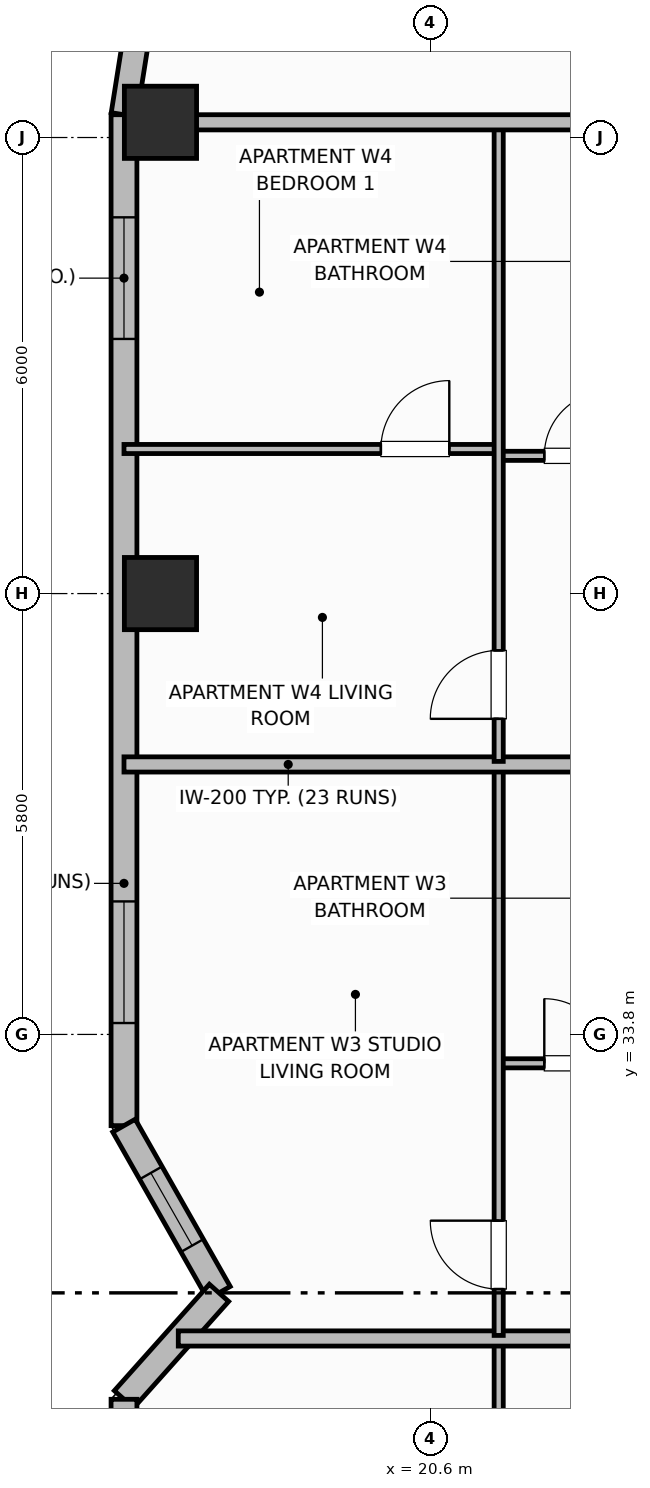
"""IFC4 building model, lengths in metres.
Left out: names, types, materials, properties, quantities, classifications, styles, units other than length and angle.
Written with IfcOpenShell. Run it as: python <this file> out.ifc"""

import sys

from ifc_helpers import new_model, si_unit, direction, frame, frame_2d, origin, origin_2d, place, context, subcontext, project, spatial, rectangle, extrude, element, fill, save


model = new_model("IFC4")
c1 = context("Model", 3, precision=1e-05, world=origin(), true_north=direction((0.0, 1.0)))
c2 = subcontext(c1, "Body", "Model", "MODEL_VIEW")
j1 = project(units=[si_unit("LENGTHUNIT", "METRE"), si_unit("PLANEANGLEUNIT", "RADIAN")], contexts=[c1])
p1 = place(None, origin())
s1 = spatial("IfcSite", under=j1, at=p1, CompositionType="ELEMENT")
p2 = place(p1, origin())
s2 = spatial("IfcBuilding", under=s1, at=p2, CompositionType="ELEMENT")
p3 = place(p2, frame((0.0, 0.0, 170.0)))
s3 = spatial("IfcBuildingStorey", under=s2, at=p3, CompositionType="ELEMENT", Elevation=170.0)
for number, where, z_axis, x_axis in (
    (1, (17.05, 39.6, 0.0), (0.0, 0.0, 1.0), (1.0, 0.0, 0.0)),
    (2, (17.05, 45.8, 0.0), (0.0, 0.0, 1.0), (1.0, 0.0, 0.0)),
):
    element("IfcColumn", number, at=place(p3, frame(where, z_axis=z_axis, x_axis=x_axis)), inside=s3, PredefinedType="COLUMN", context=c2, shape_type="SweptSolid", body=[
        extrude(rectangle(XDim=0.95, YDim=0.95, at=origin_2d()), origin(), (0.0, 0.0, 1.0), 3.7),
    ])
p4 = place(p3, frame((16.748, 47.022, 0.0), z_axis=(0.0, 0.0, 1.0), x_axis=(-0.156481329164, -0.987680916907, 0.0)))
e3 = element("IfcWall", 3, at=p4, inside=s3, PredefinedType="SOLIDWALL", context=c2, shape_type="SweptSolid", body=[
    extrude(rectangle(XDim=1.136, YDim=0.34, at=frame_2d((0.568, 0.0))), origin(), (0.0, 0.0, 1.0), 2.72),
])
p5 = place(p3, frame((16.57, 45.9, 0.0), z_axis=(0.0, 0.0, 1.0), x_axis=(0.0, -1.0, 0.0)))
e4 = element("IfcWall", 4, at=p5, inside=s3, PredefinedType="SOLIDWALL", context=c2, shape_type="SweptSolid", body=[
    extrude(rectangle(XDim=13.3, YDim=0.34, at=frame_2d((6.65, 0.0))), origin(), (0.0, 0.0, 1.0), 2.72),
])
p6 = place(p5, frame((1.35, 0.0, 0.7)))
e5 = element("IfcOpeningElement", 5, at=p6, cuts=e4, PredefinedType="OPENING", context=c2, shape_type="SweptSolid", body=[
    extrude(rectangle(XDim=1.6, YDim=1.9, at=frame_2d((0.8, 0.95))), frame((0.0, 0.18, 0.0), z_axis=(0.0, -1.0, 0.0), x_axis=(1.0, 0.0, 0.0)), (0.0, 0.0, 1.0), 0.36),
])
p7 = place(p5, frame((10.35, 0.0, 0.7)))
e6 = element("IfcOpeningElement", 6, at=p7, cuts=e4, PredefinedType="OPENING", context=c2, shape_type="SweptSolid", body=[
    extrude(rectangle(XDim=1.6, YDim=1.9, at=frame_2d((0.8, 0.95))), frame((0.0, 0.18, 0.0), z_axis=(0.0, -1.0, 0.0), x_axis=(1.0, 0.0, 0.0)), (0.0, 0.0, 1.0), 0.36),
])
p8 = place(p3, frame((16.57, 32.6, 0.0), z_axis=(0.0, 0.0, 1.0), x_axis=(0.493976255291, -0.869475393101, 0.0)))
e7 = element("IfcWall", 7, at=p8, inside=s3, PredefinedType="SOLIDWALL", context=c2, shape_type="SweptSolid", body=[
    extrude(rectangle(XDim=2.531, YDim=0.34, at=frame_2d((1.265, 0.0))), origin(), (0.0, 0.0, 1.0), 2.72),
])
p9 = place(p8, frame((0.715, 0.0, 0.91)))
e8 = element("IfcOpeningElement", 8, at=p9, cuts=e7, PredefinedType="OPENING", context=c2, shape_type="SweptSolid", body=[
    extrude(rectangle(XDim=1.1, YDim=1.65, at=frame_2d((0.55, 0.825))), frame((0.0, 0.18, 0.0), z_axis=(0.0, -1.0, 0.0), x_axis=(1.0, 0.0, 0.0)), (0.0, 0.0, 1.0), 0.36),
])
p10 = place(p3, frame((17.82, 30.4, 0.0), z_axis=(0.0, 0.0, 1.0), x_axis=(-0.666041619974, -0.74591457987, 0.0)))
e9 = element("IfcWall", 9, at=p10, inside=s3, PredefinedType="SOLIDWALL", context=c2, shape_type="SweptSolid", body=[
    extrude(rectangle(XDim=1.877, YDim=0.34, at=frame_2d((0.938, 0.0))), origin(), (0.0, 0.0, 1.0), 2.72),
])
p11 = place(p3, frame((16.57, 29.0, 0.0), z_axis=(0.0, 0.0, 1.0), x_axis=(0.0, -1.0, 0.0)))
e10 = element("IfcWall", 10, at=p11, inside=s3, PredefinedType="SOLIDWALL", context=c2, shape_type="SweptSolid", body=[
    extrude(rectangle(XDim=1.6, YDim=0.34, at=frame_2d((0.8, 0.0))), origin(), (0.0, 0.0, 1.0), 2.72),
])
p12 = place(p3, frame((21.5, 19.54, 0.0), z_axis=(0.0, 0.0, 1.0), x_axis=(0.0, 1.0, 0.0)))
e11 = element("IfcWall", 11, at=p12, inside=s3, PredefinedType="PARTITIONING", context=c2, shape_type="SweptSolid", body=[
    extrude(rectangle(XDim=10.22, YDim=0.12, at=frame_2d((5.11, 0.0))), origin(), (0.0, 0.0, 1.0), 2.55),
])
p13 = place(p12, frame((0.41, 0.0, 0.0)))
e12 = element("IfcOpeningElement", 12, at=p13, cuts=e11, PredefinedType="OPENING", context=c2, shape_type="SweptSolid", body=[
    extrude(rectangle(XDim=0.9, YDim=2.1, at=frame_2d((0.45, 1.05))), frame((0.0, 0.07, 0.0), z_axis=(0.0, -1.0, 0.0), x_axis=(1.0, 0.0, 0.0)), (0.0, 0.0, 1.0), 0.14),
])
p14 = place(p3, frame((17.284, 29.8, 0.0), z_axis=(0.0, 0.0, 1.0), x_axis=(1.0, 0.0, 0.0)))
e13 = element("IfcWall", 13, at=p14, inside=s3, PredefinedType="PARTITIONING", context=c2, shape_type="SweptSolid", body=[
    extrude(rectangle(XDim=6.466, YDim=0.2, at=frame_2d((3.233, 0.0))), origin(), (0.0, 0.0, 1.0), 2.55),
])
p15 = place(p3, frame((21.5, 33.42, 0.0), z_axis=(0.0, 0.0, 1.0), x_axis=(1.0, 0.0, 0.0)))
e14 = element("IfcWall", 14, at=p15, inside=s3, PredefinedType="PARTITIONING", context=c2, shape_type="SweptSolid", body=[
    extrude(rectangle(XDim=2.25, YDim=0.12, at=frame_2d((1.125, 0.0))), origin(), (0.0, 0.0, 1.0), 2.55),
])
p16 = place(p15, frame((0.6, 0.0, 0.0)))
e15 = element("IfcOpeningElement", 15, at=p16, cuts=e14, PredefinedType="OPENING", context=c2, shape_type="SweptSolid", body=[
    extrude(rectangle(XDim=0.85, YDim=2.1, at=frame_2d((0.425, 1.05))), frame((0.0, 0.07, 0.0), z_axis=(0.0, -1.0, 0.0), x_axis=(1.0, 0.0, 0.0)), (0.0, 0.0, 1.0), 0.14),
])
p17 = place(p3, frame((21.5, 29.84, 0.0), z_axis=(0.0, 0.0, 1.0), x_axis=(0.0, 1.0, 0.0)))
e16 = element("IfcWall", 16, at=p17, inside=s3, PredefinedType="PARTITIONING", context=c2, shape_type="SweptSolid", body=[
    extrude(rectangle(XDim=7.472, YDim=0.12, at=frame_2d((3.736, 0.0))), origin(), (0.0, 0.0, 1.0), 2.55),
])
p18 = place(p17, frame((0.61, 0.0, 0.0)))
e17 = element("IfcOpeningElement", 17, at=p18, cuts=e16, PredefinedType="OPENING", context=c2, shape_type="SweptSolid", body=[
    extrude(rectangle(XDim=0.9, YDim=2.1, at=frame_2d((0.45, 1.05))), frame((0.0, 0.07, 0.0), z_axis=(0.0, -1.0, 0.0), x_axis=(1.0, 0.0, 0.0)), (0.0, 0.0, 1.0), 0.14),
])
p19 = place(p3, frame((16.57, 37.352, 0.0), z_axis=(0.0, 0.0, 1.0), x_axis=(1.0, 0.0, 0.0)))
e18 = element("IfcWall", 18, at=p19, inside=s3, PredefinedType="PARTITIONING", context=c2, shape_type="SweptSolid", body=[
    extrude(rectangle(XDim=7.18, YDim=0.2, at=frame_2d((3.59, 0.0))), origin(), (0.0, 0.0, 1.0), 2.55),
])
p20 = place(p3, frame((21.5, 41.412, 0.0), z_axis=(0.0, 0.0, 1.0), x_axis=(1.0, 0.0, 0.0)))
e19 = element("IfcWall", 19, at=p20, inside=s3, PredefinedType="PARTITIONING", context=c2, shape_type="SweptSolid", body=[
    extrude(rectangle(XDim=2.25, YDim=0.12, at=frame_2d((1.125, 0.0))), origin(), (0.0, 0.0, 1.0), 2.55),
])
p21 = place(p20, frame((0.6, 0.0, 0.0)))
e20 = element("IfcOpeningElement", 20, at=p21, cuts=e19, PredefinedType="OPENING", context=c2, shape_type="SweptSolid", body=[
    extrude(rectangle(XDim=0.85, YDim=2.1, at=frame_2d((0.425, 1.05))), frame((0.0, 0.07, 0.0), z_axis=(0.0, -1.0, 0.0), x_axis=(1.0, 0.0, 0.0)), (0.0, 0.0, 1.0), 0.14),
])
p22 = place(p3, frame((16.57, 41.502, 0.0), z_axis=(0.0, 0.0, 1.0), x_axis=(1.0, 0.0, 0.0)))
e21 = element("IfcWall", 21, at=p22, inside=s3, PredefinedType="PARTITIONING", context=c2, shape_type="SweptSolid", body=[
    extrude(rectangle(XDim=4.93, YDim=0.12, at=frame_2d((2.465, 0.0))), origin(), (0.0, 0.0, 1.0), 2.55),
])
p23 = place(p22, frame((3.38, 0.0, 0.0)))
e22 = element("IfcOpeningElement", 22, at=p23, cuts=e21, PredefinedType="OPENING", context=c2, shape_type="SweptSolid", body=[
    extrude(rectangle(XDim=0.9, YDim=2.1, at=frame_2d((0.45, 1.05))), frame((0.0, 0.07, 0.0), z_axis=(0.0, -1.0, 0.0), x_axis=(1.0, 0.0, 0.0)), (0.0, 0.0, 1.0), 0.14),
])
p24 = place(p3, frame((21.5, 37.392, 0.0), z_axis=(0.0, 0.0, 1.0), x_axis=(0.0, 1.0, 0.0)))
e23 = element("IfcWall", 23, at=p24, inside=s3, PredefinedType="PARTITIONING", context=c2, shape_type="SweptSolid", body=[
    extrude(rectangle(XDim=8.368, YDim=0.12, at=frame_2d((4.184, 0.0))), origin(), (0.0, 0.0, 1.0), 2.55),
])
p25 = place(p24, frame((0.56, 0.0, 0.0)))
e24 = element("IfcOpeningElement", 24, at=p25, cuts=e23, PredefinedType="OPENING", context=c2, shape_type="SweptSolid", body=[
    extrude(rectangle(XDim=0.9, YDim=2.1, at=frame_2d((0.45, 1.05))), frame((0.0, 0.07, 0.0), z_axis=(0.0, -1.0, 0.0), x_axis=(1.0, 0.0, 0.0)), (0.0, 0.0, 1.0), 0.14),
])
p26 = place(p3, frame((16.99, 45.8, 0.0), z_axis=(0.0, 0.0, 1.0), x_axis=(1.0, 0.0, 0.0)))
e25 = element("IfcWall", 25, at=p26, inside=s3, PredefinedType="PARTITIONING", context=c2, shape_type="SweptSolid", body=[
    extrude(rectangle(XDim=6.76, YDim=0.2, at=frame_2d((3.38, 0.0))), origin(), (0.0, 0.0, 1.0), 2.55),
])
p27 = place(p6, origin())
e26 = element("IfcWindow", 26, at=p27, inside=s3, PartitioningType="SINGLE_PANEL", PredefinedType="WINDOW", context=c2, shape_type="SweptSolid", body=[
    extrude(rectangle(XDim=1.6, YDim=1.9, at=frame_2d((0.8, 0.95))), frame((0.0, 0.03, 0.0), z_axis=(0.0, -1.0, 0.0), x_axis=(1.0, 0.0, 0.0)), (0.0, 0.0, 1.0), 0.06),
])
fill(e5, e26)
p28 = place(p7, origin())
e27 = element("IfcWindow", 27, at=p28, inside=s3, PartitioningType="SINGLE_PANEL", PredefinedType="WINDOW", context=c2, shape_type="SweptSolid", body=[
    extrude(rectangle(XDim=1.6, YDim=1.9, at=frame_2d((0.8, 0.95))), frame((0.0, 0.03, 0.0), z_axis=(0.0, -1.0, 0.0), x_axis=(1.0, 0.0, 0.0)), (0.0, 0.0, 1.0), 0.06),
])
fill(e6, e27)
p29 = place(p9, origin())
e28 = element("IfcWindow", 28, at=p29, inside=s3, PartitioningType="SINGLE_PANEL", PredefinedType="WINDOW", context=c2, shape_type="SweptSolid", body=[
    extrude(rectangle(XDim=1.1, YDim=1.65, at=frame_2d((0.55, 0.825))), frame((0.0, 0.03, 0.0), z_axis=(0.0, -1.0, 0.0), x_axis=(1.0, 0.0, 0.0)), (0.0, 0.0, 1.0), 0.06),
])
fill(e8, e28)
p30 = place(p16, origin())
e29 = element("IfcDoor", 29, at=p30, inside=s3, OperationType="SINGLE_SWING_LEFT", PredefinedType="DOOR", context=c2, shape_type="SweptSolid", body=[
    extrude(rectangle(XDim=0.85, YDim=2.1, at=frame_2d((0.425, 1.05))), frame((0.0, 0.025, 0.0), z_axis=(0.0, -1.0, 0.0), x_axis=(1.0, 0.0, 0.0)), (0.0, 0.0, 1.0), 0.05),
])
fill(e15, e29)
p31 = place(p18, origin())
e30 = element("IfcDoor", 30, at=p31, inside=s3, OperationType="SINGLE_SWING_RIGHT", PredefinedType="DOOR", context=c2, shape_type="SweptSolid", body=[
    extrude(rectangle(XDim=0.9, YDim=2.1, at=frame_2d((0.45, 1.05))), frame((0.0, 0.025, 0.0), z_axis=(0.0, -1.0, 0.0), x_axis=(1.0, 0.0, 0.0)), (0.0, 0.0, 1.0), 0.05),
])
fill(e17, e30)
p32 = place(p21, origin())
e31 = element("IfcDoor", 31, at=p32, inside=s3, OperationType="SINGLE_SWING_RIGHT", PredefinedType="DOOR", context=c2, shape_type="SweptSolid", body=[
    extrude(rectangle(XDim=0.85, YDim=2.1, at=frame_2d((0.425, 1.05))), frame((0.0, 0.025, 0.0), z_axis=(0.0, -1.0, 0.0), x_axis=(1.0, 0.0, 0.0)), (0.0, 0.0, 1.0), 0.05),
])
fill(e20, e31)
p33 = place(p23, origin())
e32 = element("IfcDoor", 32, at=p33, inside=s3, OperationType="SINGLE_SWING_RIGHT", PredefinedType="DOOR", context=c2, shape_type="SweptSolid", body=[
    extrude(rectangle(XDim=0.9, YDim=2.1, at=frame_2d((0.45, 1.05))), frame((0.0, 0.025, 0.0), z_axis=(0.0, -1.0, 0.0), x_axis=(1.0, 0.0, 0.0)), (0.0, 0.0, 1.0), 0.05),
])
fill(e22, e32)
p34 = place(p25, origin())
e33 = element("IfcDoor", 33, at=p34, inside=s3, OperationType="SINGLE_SWING_LEFT", PredefinedType="DOOR", context=c2, shape_type="SweptSolid", body=[
    extrude(rectangle(XDim=0.9, YDim=2.1, at=frame_2d((0.45, 1.05))), frame((0.0, 0.025, 0.0), z_axis=(0.0, -1.0, 0.0), x_axis=(1.0, 0.0, 0.0)), (0.0, 0.0, 1.0), 0.05),
])
fill(e24, e33)
save(model, sys.argv[1])
